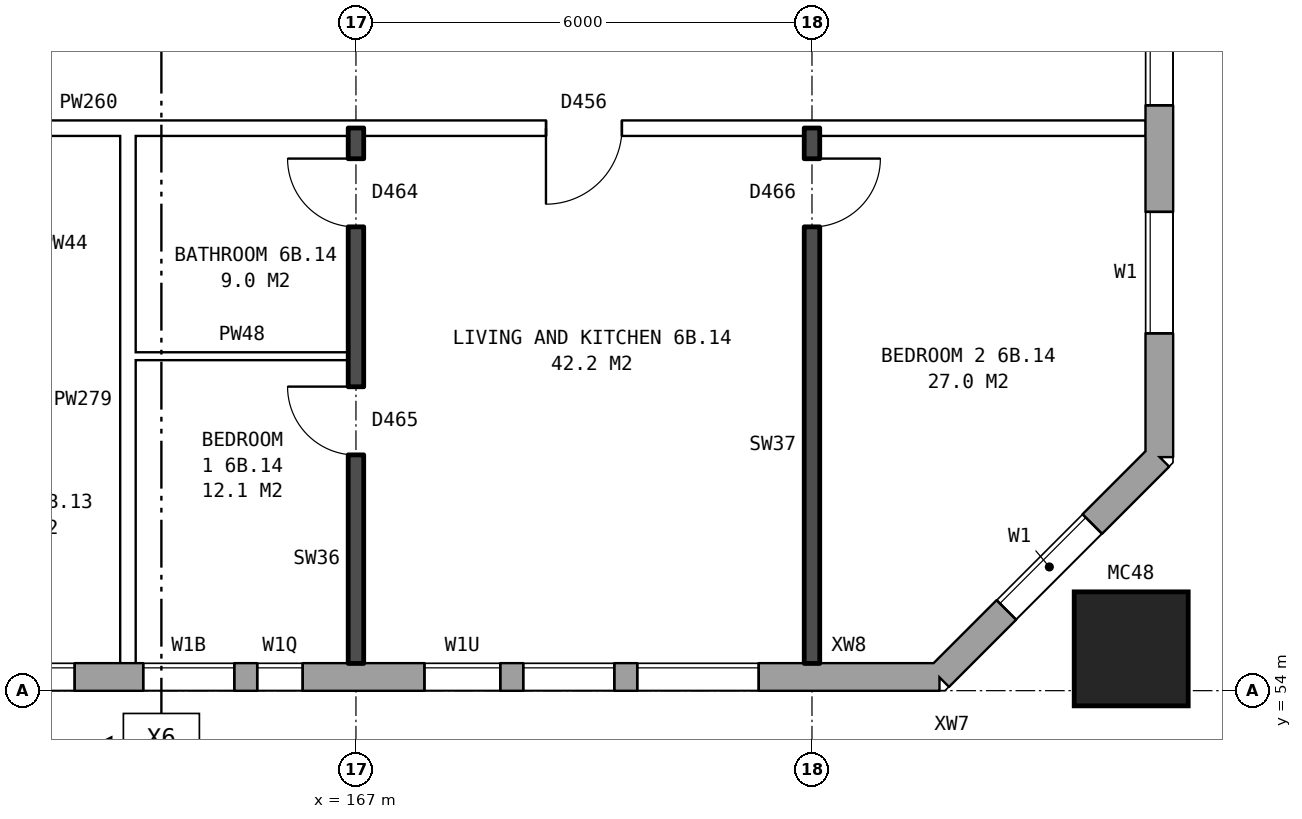
"""IFC4 building model, lengths in metres.
Left out: names, types, materials, properties, quantities, classifications, styles, units other than length and angle.
Written with IfcOpenShell. Run it as: python <this file> out.ifc"""

import sys

from ifc_helpers import new_model, si_unit, direction, frame, frame_2d, origin, origin_2d, place, context, subcontext, project, spatial, rectangle, hollow_rectangle, extrude, element, fill, save


model = new_model("IFC4")
c1 = context("Model", 3, precision=1e-05, world=origin(), true_north=direction((0.0, 1.0)))
c2 = subcontext(c1, "Body", "Model", "MODEL_VIEW")
j1 = project(units=[si_unit("LENGTHUNIT", "METRE"), si_unit("PLANEANGLEUNIT", "RADIAN")], contexts=[c1])
p1 = place(None, origin())
s1 = spatial("IfcSite", under=j1, at=p1, CompositionType="ELEMENT")
p2 = place(p1, origin())
s2 = spatial("IfcBuilding", under=s1, at=p2, CompositionType="ELEMENT")
p3 = place(p2, frame((0.0, 0.0, 25.7)))
s3 = spatial("IfcBuildingStorey", under=s2, at=p3, CompositionType="ELEMENT", Elevation=25.7)
p4 = place(p3, frame((177.2, 54.55, 0.0), z_axis=(0.0, 0.0, 1.0), x_axis=(1.0, 0.0, 0.0)))
e1 = element("IfcColumn", 1, at=p4, inside=s3, PredefinedType="COLUMN", context=c2, shape_type="SweptSolid", body=[
    extrude(hollow_rectangle(XDim=1.5, YDim=1.5, WallThickness=0.08, at=origin_2d()), origin(), (0.0, 0.0, 1.0), 3.1),
])
p5 = place(p3, frame((134.075, 54.18, 0.0), z_axis=(0.0, 0.0, 1.0), x_axis=(1.0, 0.0, 0.0)))
e2 = element("IfcWall", 2, at=p5, inside=s3, PredefinedType="STANDARD", context=c2, shape_type="SweptSolid", body=[
    extrude(rectangle(XDim=40.601, YDim=0.36, at=frame_2d((20.3, 0.0))), origin(), (0.0, 0.0, 1.0), 2.85),
])
p6 = place(p5, frame((0.625, 0.0, 0.8)))
e3 = element("IfcOpeningElement", 3, at=p6, cuts=e2, PredefinedType="OPENING", context=c2, shape_type="SweptSolid", body=[
    extrude(rectangle(XDim=1.6, YDim=1.8, at=frame_2d((0.8, 0.9))), frame((0.0, 0.19, 0.0), z_axis=(0.0, -1.0, 0.0), x_axis=(1.0, 0.0, 0.0)), (0.0, 0.0, 1.0), 0.38),
])
p7 = place(p5, frame((3.625, 0.0, 0.8)))
e4 = element("IfcOpeningElement", 4, at=p7, cuts=e2, PredefinedType="OPENING", context=c2, shape_type="SweptSolid", body=[
    extrude(rectangle(XDim=1.6, YDim=1.8, at=frame_2d((0.8, 0.9))), frame((0.0, 0.19, 0.0), z_axis=(0.0, -1.0, 0.0), x_axis=(1.0, 0.0, 0.0)), (0.0, 0.0, 1.0), 0.38),
])
p8 = place(p5, frame((5.525, 0.0, 1.7)))
e5 = element("IfcOpeningElement", 5, at=p8, cuts=e2, PredefinedType="OPENING", context=c2, shape_type="SweptSolid", body=[
    extrude(rectangle(XDim=1.2, YDim=0.9, at=frame_2d((0.6, 0.45))), frame((0.0, 0.19, 0.0), z_axis=(0.0, -1.0, 0.0), x_axis=(1.0, 0.0, 0.0)), (0.0, 0.0, 1.0), 0.38),
])
p9 = place(p5, frame((9.625, 0.0, 0.8)))
e6 = element("IfcOpeningElement", 6, at=p9, cuts=e2, PredefinedType="OPENING", context=c2, shape_type="SweptSolid", body=[
    extrude(rectangle(XDim=1.6, YDim=1.8, at=frame_2d((0.8, 0.9))), frame((0.0, 0.19, 0.0), z_axis=(0.0, -1.0, 0.0), x_axis=(1.0, 0.0, 0.0)), (0.0, 0.0, 1.0), 0.38),
])
p10 = place(p5, frame((12.625, 0.0, 0.8)))
e7 = element("IfcOpeningElement", 7, at=p10, cuts=e2, PredefinedType="OPENING", context=c2, shape_type="SweptSolid", body=[
    extrude(rectangle(XDim=1.6, YDim=1.8, at=frame_2d((0.8, 0.9))), frame((0.0, 0.19, 0.0), z_axis=(0.0, -1.0, 0.0), x_axis=(1.0, 0.0, 0.0)), (0.0, 0.0, 1.0), 0.38),
])
p11 = place(p5, frame((15.625, 0.0, 0.8)))
e8 = element("IfcOpeningElement", 8, at=p11, cuts=e2, PredefinedType="OPENING", context=c2, shape_type="SweptSolid", body=[
    extrude(rectangle(XDim=1.6, YDim=1.8, at=frame_2d((0.8, 0.9))), frame((0.0, 0.19, 0.0), z_axis=(0.0, -1.0, 0.0), x_axis=(1.0, 0.0, 0.0)), (0.0, 0.0, 1.0), 0.38),
])
p12 = place(p5, frame((18.625, 0.0, 0.8)))
e9 = element("IfcOpeningElement", 9, at=p12, cuts=e2, PredefinedType="OPENING", context=c2, shape_type="SweptSolid", body=[
    extrude(rectangle(XDim=1.6, YDim=1.8, at=frame_2d((0.8, 0.9))), frame((0.0, 0.19, 0.0), z_axis=(0.0, -1.0, 0.0), x_axis=(1.0, 0.0, 0.0)), (0.0, 0.0, 1.0), 0.38),
])
p13 = place(p5, frame((21.625, 0.0, 0.8)))
e10 = element("IfcOpeningElement", 10, at=p13, cuts=e2, PredefinedType="OPENING", context=c2, shape_type="SweptSolid", body=[
    extrude(rectangle(XDim=1.6, YDim=1.8, at=frame_2d((0.8, 0.9))), frame((0.0, 0.19, 0.0), z_axis=(0.0, -1.0, 0.0), x_axis=(1.0, 0.0, 0.0)), (0.0, 0.0, 1.0), 0.38),
])
p14 = place(p5, frame((24.625, 0.0, 0.8)))
e11 = element("IfcOpeningElement", 11, at=p14, cuts=e2, PredefinedType="OPENING", context=c2, shape_type="SweptSolid", body=[
    extrude(rectangle(XDim=1.6, YDim=1.8, at=frame_2d((0.8, 0.9))), frame((0.0, 0.19, 0.0), z_axis=(0.0, -1.0, 0.0), x_axis=(1.0, 0.0, 0.0)), (0.0, 0.0, 1.0), 0.38),
])
p15 = place(p5, frame((27.625, 0.0, 0.8)))
e12 = element("IfcOpeningElement", 12, at=p15, cuts=e2, PredefinedType="OPENING", context=c2, shape_type="SweptSolid", body=[
    extrude(rectangle(XDim=1.6, YDim=1.8, at=frame_2d((0.8, 0.9))), frame((0.0, 0.19, 0.0), z_axis=(0.0, -1.0, 0.0), x_axis=(1.0, 0.0, 0.0)), (0.0, 0.0, 1.0), 0.38),
])
p16 = place(p5, frame((30.125, 0.0, 0.8)))
e13 = element("IfcOpeningElement", 13, at=p16, cuts=e2, PredefinedType="OPENING", context=c2, shape_type="SweptSolid", body=[
    extrude(rectangle(XDim=1.2, YDim=1.8, at=frame_2d((0.6, 0.9))), frame((0.0, 0.19, 0.0), z_axis=(0.0, -1.0, 0.0), x_axis=(1.0, 0.0, 0.0)), (0.0, 0.0, 1.0), 0.38),
])
p17 = place(p5, frame((33.825, 0.0, 1.7)))
e14 = element("IfcOpeningElement", 14, at=p17, cuts=e2, PredefinedType="OPENING", context=c2, shape_type="SweptSolid", body=[
    extrude(rectangle(XDim=1.0, YDim=0.9, at=frame_2d((0.5, 0.45))), frame((0.0, 0.19, 0.0), z_axis=(0.0, -1.0, 0.0), x_axis=(1.0, 0.0, 0.0)), (0.0, 0.0, 1.0), 0.38),
])
p18 = place(p5, frame((36.625, 0.0, 0.8)))
e15 = element("IfcOpeningElement", 15, at=p18, cuts=e2, PredefinedType="OPENING", context=c2, shape_type="SweptSolid", body=[
    extrude(rectangle(XDim=1.6, YDim=1.8, at=frame_2d((0.8, 0.9))), frame((0.0, 0.19, 0.0), z_axis=(0.0, -1.0, 0.0), x_axis=(1.0, 0.0, 0.0)), (0.0, 0.0, 1.0), 0.38),
])
p19 = place(p5, frame((8.025, 0.0, 0.8)))
e16 = element("IfcOpeningElement", 16, at=p19, cuts=e2, PredefinedType="OPENING", context=c2, shape_type="SweptSolid", body=[
    extrude(rectangle(XDim=0.6, YDim=0.9, at=frame_2d((0.3, 0.45))), frame((0.0, 0.19, 0.0), z_axis=(0.0, -1.0, 0.0), x_axis=(1.0, 0.0, 0.0)), (0.0, 0.0, 1.0), 0.38),
])
p20 = place(p5, frame((31.625, 0.0, 0.8)))
e17 = element("IfcOpeningElement", 17, at=p20, cuts=e2, PredefinedType="OPENING", context=c2, shape_type="SweptSolid", body=[
    extrude(rectangle(XDim=0.6, YDim=1.2, at=frame_2d((0.3, 0.6))), frame((0.0, 0.19, 0.0), z_axis=(0.0, -1.0, 0.0), x_axis=(1.0, 0.0, 0.0)), (0.0, 0.0, 1.0), 0.38),
])
p21 = place(p5, frame((35.125, 0.0, 0.8)))
e18 = element("IfcOpeningElement", 18, at=p21, cuts=e2, PredefinedType="OPENING", context=c2, shape_type="SweptSolid", body=[
    extrude(rectangle(XDim=1.2, YDim=1.8, at=frame_2d((0.6, 0.9))), frame((0.0, 0.19, 0.0), z_axis=(0.0, -1.0, 0.0), x_axis=(1.0, 0.0, 0.0)), (0.0, 0.0, 1.0), 0.38),
])
p22 = place(p3, frame((174.675, 54.18, 0.0), z_axis=(0.0, 0.0, 1.0), x_axis=(0.707106781187, 0.707106781187, 0.0)))
e19 = element("IfcWall", 19, at=p22, inside=s3, PredefinedType="STANDARD", context=c2, shape_type="SweptSolid", body=[
    extrude(rectangle(XDim=4.094, YDim=0.36, at=frame_2d((2.047, 0.0))), origin(), (0.0, 0.0, 1.0), 2.85),
])
p23 = place(p22, frame((1.247, 0.0, 0.8)))
e20 = element("IfcOpeningElement", 20, at=p23, cuts=e19, PredefinedType="OPENING", context=c2, shape_type="SweptSolid", body=[
    extrude(rectangle(XDim=1.6, YDim=1.8, at=frame_2d((0.8, 0.9))), frame((0.0, 0.19, 0.0), z_axis=(0.0, -1.0, 0.0), x_axis=(1.0, 0.0, 0.0)), (0.0, 0.0, 1.0), 0.38),
])
p24 = place(p3, frame((177.57, 57.075, 0.0), z_axis=(0.0, 0.0, 1.0), x_axis=(0.0, 1.0, 0.0)))
e21 = element("IfcWall", 21, at=p24, inside=s3, PredefinedType="STANDARD", context=c2, shape_type="SweptSolid", body=[
    extrude(rectangle(XDim=25.851, YDim=0.36, at=frame_2d((12.925, 0.0))), origin(), (0.0, 0.0, 1.0), 2.85),
])
p25 = place(p24, frame((1.625, 0.0, 0.8)))
e22 = element("IfcOpeningElement", 22, at=p25, cuts=e21, PredefinedType="OPENING", context=c2, shape_type="SweptSolid", body=[
    extrude(rectangle(XDim=1.6, YDim=1.8, at=frame_2d((0.8, 0.9))), frame((0.0, 0.19, 0.0), z_axis=(0.0, -1.0, 0.0), x_axis=(1.0, 0.0, 0.0)), (0.0, 0.0, 1.0), 0.38),
])
p26 = place(p24, frame((4.625, 0.0, 0.8)))
e23 = element("IfcOpeningElement", 23, at=p26, cuts=e21, PredefinedType="OPENING", context=c2, shape_type="SweptSolid", body=[
    extrude(rectangle(XDim=1.6, YDim=1.8, at=frame_2d((0.8, 0.9))), frame((0.0, 0.19, 0.0), z_axis=(0.0, -1.0, 0.0), x_axis=(1.0, 0.0, 0.0)), (0.0, 0.0, 1.0), 0.38),
])
p27 = place(p24, frame((6.525, 0.0, 0.8)))
e24 = element("IfcOpeningElement", 24, at=p27, cuts=e21, PredefinedType="OPENING", context=c2, shape_type="SweptSolid", body=[
    extrude(rectangle(XDim=1.6, YDim=1.8, at=frame_2d((0.8, 0.9))), frame((0.0, 0.19, 0.0), z_axis=(0.0, -1.0, 0.0), x_axis=(1.0, 0.0, 0.0)), (0.0, 0.0, 1.0), 0.38),
])
p28 = place(p24, frame((8.425, 0.0, 1.1)))
e25 = element("IfcOpeningElement", 25, at=p28, cuts=e21, PredefinedType="OPENING", context=c2, shape_type="SweptSolid", body=[
    extrude(rectangle(XDim=0.8, YDim=1.5, at=frame_2d((0.4, 0.75))), frame((0.0, 0.19, 0.0), z_axis=(0.0, -1.0, 0.0), x_axis=(1.0, 0.0, 0.0)), (0.0, 0.0, 1.0), 0.38),
])
p29 = place(p24, frame((9.525, 0.0, 1.6)))
e26 = element("IfcOpeningElement", 26, at=p29, cuts=e21, PredefinedType="OPENING", context=c2, shape_type="SweptSolid", body=[
    extrude(rectangle(XDim=0.6, YDim=0.9, at=frame_2d((0.3, 0.45))), frame((0.0, 0.19, 0.0), z_axis=(0.0, -1.0, 0.0), x_axis=(1.0, 0.0, 0.0)), (0.0, 0.0, 1.0), 0.38),
])
p30 = place(p24, frame((11.525, 0.0, 0.8)))
e27 = element("IfcOpeningElement", 27, at=p30, cuts=e21, PredefinedType="OPENING", context=c2, shape_type="SweptSolid", body=[
    extrude(rectangle(XDim=0.6, YDim=0.9, at=frame_2d((0.3, 0.45))), frame((0.0, 0.19, 0.0), z_axis=(0.0, -1.0, 0.0), x_axis=(1.0, 0.0, 0.0)), (0.0, 0.0, 1.0), 0.38),
])
p31 = place(p24, frame((19.625, 0.0, 0.8)))
e28 = element("IfcOpeningElement", 28, at=p31, cuts=e21, PredefinedType="OPENING", context=c2, shape_type="SweptSolid", body=[
    extrude(rectangle(XDim=1.6, YDim=1.8, at=frame_2d((0.8, 0.9))), frame((0.0, 0.19, 0.0), z_axis=(0.0, -1.0, 0.0), x_axis=(1.0, 0.0, 0.0)), (0.0, 0.0, 1.0), 0.38),
])
p32 = place(p24, frame((22.625, 0.0, 0.8)))
e29 = element("IfcOpeningElement", 29, at=p32, cuts=e21, PredefinedType="OPENING", context=c2, shape_type="SweptSolid", body=[
    extrude(rectangle(XDim=1.6, YDim=1.8, at=frame_2d((0.8, 0.9))), frame((0.0, 0.19, 0.0), z_axis=(0.0, -1.0, 0.0), x_axis=(1.0, 0.0, 0.0)), (0.0, 0.0, 1.0), 0.38),
])
p33 = place(p24, frame((12.425, 0.0, 0.8)))
e30 = element("IfcOpeningElement", 30, at=p33, cuts=e21, PredefinedType="OPENING", context=c2, shape_type="SweptSolid", body=[
    extrude(rectangle(XDim=1.0, YDim=1.8, at=frame_2d((0.5, 0.9))), frame((0.0, 0.19, 0.0), z_axis=(0.0, -1.0, 0.0), x_axis=(1.0, 0.0, 0.0)), (0.0, 0.0, 1.0), 0.38),
])
p34 = place(p24, frame((13.725, 0.0, 0.8)))
e31 = element("IfcOpeningElement", 31, at=p34, cuts=e21, PredefinedType="OPENING", context=c2, shape_type="SweptSolid", body=[
    extrude(rectangle(XDim=0.6, YDim=0.9, at=frame_2d((0.3, 0.45))), frame((0.0, 0.19, 0.0), z_axis=(0.0, -1.0, 0.0), x_axis=(1.0, 0.0, 0.0)), (0.0, 0.0, 1.0), 0.38),
])
p35 = place(p24, frame((15.575, 0.0, 1.7)))
e32 = element("IfcOpeningElement", 32, at=p35, cuts=e21, PredefinedType="OPENING", context=c2, shape_type="SweptSolid", body=[
    extrude(rectangle(XDim=0.6, YDim=0.9, at=frame_2d((0.3, 0.45))), frame((0.0, 0.19, 0.0), z_axis=(0.0, -1.0, 0.0), x_axis=(1.0, 0.0, 0.0)), (0.0, 0.0, 1.0), 0.38),
])
p36 = place(p24, frame((16.575, 0.0, 1.1)))
e33 = element("IfcOpeningElement", 33, at=p36, cuts=e21, PredefinedType="OPENING", context=c2, shape_type="SweptSolid", body=[
    extrude(rectangle(XDim=0.8, YDim=1.5, at=frame_2d((0.4, 0.75))), frame((0.0, 0.19, 0.0), z_axis=(0.0, -1.0, 0.0), x_axis=(1.0, 0.0, 0.0)), (0.0, 0.0, 1.0), 0.38),
])
p37 = place(p24, frame((17.675, 0.0, 0.8)))
e34 = element("IfcOpeningElement", 34, at=p37, cuts=e21, PredefinedType="OPENING", context=c2, shape_type="SweptSolid", body=[
    extrude(rectangle(XDim=1.6, YDim=1.8, at=frame_2d((0.8, 0.9))), frame((0.0, 0.19, 0.0), z_axis=(0.0, -1.0, 0.0), x_axis=(1.0, 0.0, 0.0)), (0.0, 0.0, 1.0), 0.38),
])
p38 = place(p3, frame((164.1, 58.4, 0.0), z_axis=(0.0, 0.0, 1.0), x_axis=(1.0, 0.0, 0.0)))
e35 = element("IfcWall", 35, at=p38, inside=s3, PredefinedType="PARTITIONING", context=c2, shape_type="SweptSolid", body=[
    extrude(rectangle(XDim=2.8, YDim=0.1, at=frame_2d((1.4, 0.0))), origin(), (0.0, 0.0, 1.0), 2.85),
])
p39 = place(p3, frame((155.1, 61.4, 0.0), z_axis=(0.0, 0.0, 1.0), x_axis=(1.0, 0.0, 0.0)))
e36 = element("IfcWall", 36, at=p39, inside=s3, PredefinedType="PARTITIONING", context=c2, shape_type="SweptSolid", body=[
    extrude(rectangle(XDim=22.29, YDim=0.2, at=frame_2d((11.145, 0.0))), origin(), (0.0, 0.0, 1.0), 2.85),
])
p40 = place(p39, frame((2.45, 0.0, 0.0)))
e37 = element("IfcOpeningElement", 37, at=p40, cuts=e36, PredefinedType="OPENING", context=c2, shape_type="SweptSolid", body=[
    extrude(rectangle(XDim=1.0, YDim=2.1, at=frame_2d((0.5, 1.05))), frame((0.0, 0.11, 0.0), z_axis=(0.0, -1.0, 0.0), x_axis=(1.0, 0.0, 0.0)), (0.0, 0.0, 1.0), 0.22),
])
p41 = place(p39, frame((14.4, 0.0, 0.0)))
e38 = element("IfcOpeningElement", 38, at=p41, cuts=e36, PredefinedType="OPENING", context=c2, shape_type="SweptSolid", body=[
    extrude(rectangle(XDim=1.0, YDim=2.1, at=frame_2d((0.5, 1.05))), frame((0.0, 0.11, 0.0), z_axis=(0.0, -1.0, 0.0), x_axis=(1.0, 0.0, 0.0)), (0.0, 0.0, 1.0), 0.22),
])
p42 = place(p3, frame((164.0, 54.36, 0.0), z_axis=(0.0, 0.0, 1.0), x_axis=(0.0, 1.0, 0.0)))
e39 = element("IfcWall", 39, at=p42, inside=s3, PredefinedType="PARTITIONING", context=c2, shape_type="SweptSolid", body=[
    extrude(rectangle(XDim=6.94, YDim=0.2, at=frame_2d((3.47, 0.0))), origin(), (0.0, 0.0, 1.0), 2.85),
])
p43 = place(p3, frame((167.0, 54.36, 0.0), z_axis=(0.0, 0.0, 1.0), x_axis=(0.0, 1.0, 0.0)))
e40 = element("IfcWall", 40, at=p43, inside=s3, PredefinedType="SOLIDWALL", context=c2, shape_type="SweptSolid", body=[
    extrude(rectangle(XDim=7.04, YDim=0.2, at=frame_2d((3.52, 0.0))), origin(), (0.0, 0.0, 1.0), 2.85),
])
p44 = place(p43, frame((2.74, 0.0, 0.0)))
e41 = element("IfcOpeningElement", 41, at=p44, cuts=e40, PredefinedType="OPENING", context=c2, shape_type="SweptSolid", body=[
    extrude(rectangle(XDim=0.9, YDim=2.1, at=frame_2d((0.45, 1.05))), frame((0.0, 0.11, 0.0), z_axis=(0.0, -1.0, 0.0), x_axis=(1.0, 0.0, 0.0)), (0.0, 0.0, 1.0), 0.22),
])
p45 = place(p43, frame((5.74, 0.0, 0.0)))
e42 = element("IfcOpeningElement", 42, at=p45, cuts=e40, PredefinedType="OPENING", context=c2, shape_type="SweptSolid", body=[
    extrude(rectangle(XDim=0.9, YDim=2.1, at=frame_2d((0.45, 1.05))), frame((0.0, 0.11, 0.0), z_axis=(0.0, -1.0, 0.0), x_axis=(1.0, 0.0, 0.0)), (0.0, 0.0, 1.0), 0.22),
])
p46 = place(p3, frame((173.0, 54.36, 0.0), z_axis=(0.0, 0.0, 1.0), x_axis=(0.0, 1.0, 0.0)))
e43 = element("IfcWall", 43, at=p46, inside=s3, PredefinedType="SOLIDWALL", context=c2, shape_type="SweptSolid", body=[
    extrude(rectangle(XDim=7.04, YDim=0.2, at=frame_2d((3.52, 0.0))), origin(), (0.0, 0.0, 1.0), 2.85),
])
p47 = place(p46, frame((5.74, 0.0, 0.0)))
e44 = element("IfcOpeningElement", 44, at=p47, cuts=e43, PredefinedType="OPENING", context=c2, shape_type="SweptSolid", body=[
    extrude(rectangle(XDim=0.9, YDim=2.1, at=frame_2d((0.45, 1.05))), frame((0.0, 0.11, 0.0), z_axis=(0.0, -1.0, 0.0), x_axis=(1.0, 0.0, 0.0)), (0.0, 0.0, 1.0), 0.22),
])
p48 = place(p15, origin())
e45 = element("IfcWindow", 45, at=p48, inside=s3, PartitioningType="SINGLE_PANEL", PredefinedType="WINDOW", context=c2, shape_type="SweptSolid", body=[
    extrude(rectangle(XDim=1.6, YDim=1.8, at=frame_2d((0.8, 0.9))), frame((0.0, 0.15, 0.0), z_axis=(0.0, -1.0, 0.0), x_axis=(1.0, 0.0, 0.0)), (0.0, 0.0, 1.0), 0.06),
])
fill(e12, e45)
p49 = place(p16, origin())
e46 = element("IfcWindow", 46, at=p49, inside=s3, PartitioningType="SINGLE_PANEL", PredefinedType="WINDOW", context=c2, shape_type="SweptSolid", body=[
    extrude(rectangle(XDim=1.2, YDim=1.8, at=frame_2d((0.6, 0.9))), frame((0.0, 0.15, 0.0), z_axis=(0.0, -1.0, 0.0), x_axis=(1.0, 0.0, 0.0)), (0.0, 0.0, 1.0), 0.06),
])
fill(e13, e46)
p50 = place(p17, origin())
e47 = element("IfcWindow", 47, at=p50, inside=s3, PartitioningType="SINGLE_PANEL", PredefinedType="WINDOW", context=c2, shape_type="SweptSolid", body=[
    extrude(rectangle(XDim=1.0, YDim=0.9, at=frame_2d((0.5, 0.45))), frame((0.0, 0.15, 0.0), z_axis=(0.0, -1.0, 0.0), x_axis=(1.0, 0.0, 0.0)), (0.0, 0.0, 1.0), 0.06),
])
fill(e14, e47)
p51 = place(p18, origin())
e48 = element("IfcWindow", 48, at=p51, inside=s3, PartitioningType="SINGLE_PANEL", PredefinedType="WINDOW", context=c2, shape_type="SweptSolid", body=[
    extrude(rectangle(XDim=1.6, YDim=1.8, at=frame_2d((0.8, 0.9))), frame((0.0, 0.15, 0.0), z_axis=(0.0, -1.0, 0.0), x_axis=(1.0, 0.0, 0.0)), (0.0, 0.0, 1.0), 0.06),
])
fill(e15, e48)
p52 = place(p23, origin())
e49 = element("IfcWindow", 49, at=p52, inside=s3, PartitioningType="SINGLE_PANEL", PredefinedType="WINDOW", context=c2, shape_type="SweptSolid", body=[
    extrude(rectangle(XDim=1.6, YDim=1.8, at=frame_2d((0.8, 0.9))), frame((0.0, 0.15, 0.0), z_axis=(0.0, -1.0, 0.0), x_axis=(1.0, 0.0, 0.0)), (0.0, 0.0, 1.0), 0.06),
])
fill(e20, e49)
p53 = place(p25, origin())
e50 = element("IfcWindow", 50, at=p53, inside=s3, PartitioningType="SINGLE_PANEL", PredefinedType="WINDOW", context=c2, shape_type="SweptSolid", body=[
    extrude(rectangle(XDim=1.6, YDim=1.8, at=frame_2d((0.8, 0.9))), frame((0.0, 0.15, 0.0), z_axis=(0.0, -1.0, 0.0), x_axis=(1.0, 0.0, 0.0)), (0.0, 0.0, 1.0), 0.06),
])
fill(e22, e50)
p54 = place(p26, origin())
e51 = element("IfcWindow", 51, at=p54, inside=s3, PartitioningType="SINGLE_PANEL", PredefinedType="WINDOW", context=c2, shape_type="SweptSolid", body=[
    extrude(rectangle(XDim=1.6, YDim=1.8, at=frame_2d((0.8, 0.9))), frame((0.0, 0.15, 0.0), z_axis=(0.0, -1.0, 0.0), x_axis=(1.0, 0.0, 0.0)), (0.0, 0.0, 1.0), 0.06),
])
fill(e23, e51)
p55 = place(p44, origin())
e52 = element("IfcDoor", 52, at=p55, inside=s3, OperationType="SINGLE_SWING_RIGHT", PredefinedType="DOOR", context=c2, shape_type="SweptSolid", body=[
    extrude(rectangle(XDim=0.9, YDim=2.1, at=frame_2d((0.45, 1.05))), frame((0.0, 0.025, 0.0), z_axis=(0.0, -1.0, 0.0), x_axis=(1.0, 0.0, 0.0)), (0.0, 0.0, 1.0), 0.05),
])
fill(e41, e52)
p56 = place(p47, frame((0.9, 0.0, 0.0), z_axis=(0.0, 0.0, 1.0), x_axis=(-1.0, 0.0, 0.0)))
e53 = element("IfcDoor", 53, at=p56, inside=s3, OperationType="SINGLE_SWING_LEFT", PredefinedType="DOOR", context=c2, shape_type="SweptSolid", body=[
    extrude(rectangle(XDim=0.9, YDim=2.1, at=frame_2d((0.45, 1.05))), frame((0.0, 0.025, 0.0), z_axis=(0.0, -1.0, 0.0), x_axis=(1.0, 0.0, 0.0)), (0.0, 0.0, 1.0), 0.05),
])
fill(e44, e53)
p57 = place(p41, frame((1.0, 0.0, 0.0), z_axis=(0.0, 0.0, 1.0), x_axis=(-1.0, 0.0, 0.0)))
e54 = element("IfcDoor", 54, at=p57, inside=s3, OperationType="SINGLE_SWING_RIGHT", PredefinedType="DOOR", context=c2, shape_type="SweptSolid", body=[
    extrude(rectangle(XDim=1.0, YDim=2.1, at=frame_2d((0.5, 1.05))), frame((0.0, 0.025, 0.0), z_axis=(0.0, -1.0, 0.0), x_axis=(1.0, 0.0, 0.0)), (0.0, 0.0, 1.0), 0.05),
])
fill(e38, e54)
p58 = place(p45, origin())
e55 = element("IfcDoor", 55, at=p58, inside=s3, OperationType="SINGLE_SWING_RIGHT", PredefinedType="DOOR", context=c2, shape_type="SweptSolid", body=[
    extrude(rectangle(XDim=0.9, YDim=2.1, at=frame_2d((0.45, 1.05))), frame((0.0, 0.025, 0.0), z_axis=(0.0, -1.0, 0.0), x_axis=(1.0, 0.0, 0.0)), (0.0, 0.0, 1.0), 0.05),
])
fill(e42, e55)
p59 = place(p20, origin())
e56 = element("IfcWindow", 56, at=p59, inside=s3, PartitioningType="SINGLE_PANEL", PredefinedType="WINDOW", context=c2, shape_type="SweptSolid", body=[
    extrude(rectangle(XDim=0.6, YDim=1.2, at=frame_2d((0.3, 0.6))), frame((0.0, 0.15, 0.0), z_axis=(0.0, -1.0, 0.0), x_axis=(1.0, 0.0, 0.0)), (0.0, 0.0, 1.0), 0.06),
])
fill(e17, e56)
p60 = place(p21, origin())
e57 = element("IfcWindow", 57, at=p60, inside=s3, PartitioningType="SINGLE_PANEL", PredefinedType="WINDOW", context=c2, shape_type="SweptSolid", body=[
    extrude(rectangle(XDim=1.2, YDim=1.8, at=frame_2d((0.6, 0.9))), frame((0.0, 0.15, 0.0), z_axis=(0.0, -1.0, 0.0), x_axis=(1.0, 0.0, 0.0)), (0.0, 0.0, 1.0), 0.06),
])
fill(e18, e57)
save(model, sys.argv[1])
